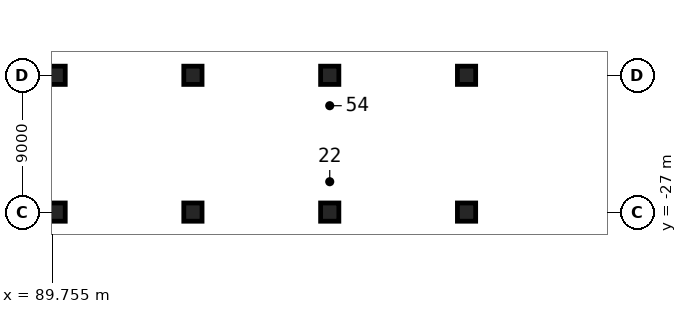
"""IFC4 building model, lengths in metres.
Left out: names, types, materials, properties, quantities, classifications, styles, units other than length and angle.
Written with IfcOpenShell. Run it as: python <this file> out.ifc"""

import sys

from ifc_helpers import new_model, si_unit, direction, frame, origin, origin_2d, place, context, subcontext, project, spatial, rectangle, extrude, element, save


model = new_model("IFC4")
c1 = context("Model", 3, precision=1e-05, world=origin(), true_north=direction((0.0, 1.0)))
c2 = subcontext(c1, "Body", "Model", "MODEL_VIEW")
j1 = project(units=[si_unit("LENGTHUNIT", "METRE"), si_unit("PLANEANGLEUNIT", "RADIAN")], contexts=[c1])
p1 = place(None, origin())
s1 = spatial("IfcSite", under=j1, at=p1, CompositionType="ELEMENT")
p2 = place(p1, origin())
s2 = spatial("IfcBuilding", under=s1, at=p2, CompositionType="ELEMENT")
p3 = place(p2, frame((0.0, 0.0, -9.0)))
s3 = spatial("IfcBuildingStorey", under=s2, at=p3, CompositionType="ELEMENT", Elevation=-9.0)
for number, where, z_axis, x_axis in (
    (1, (90.0, -27.0, 0.0), (0.0, 0.0, 1.0), (1.0, 0.0, 0.0)),
    (2, (90.0, -18.0, 0.0), (0.0, 0.0, 1.0), (1.0, 0.0, 0.0)),
    (3, (99.0, -27.0, 0.0), (0.0, 0.0, 1.0), (1.0, 0.0, 0.0)),
    (4, (99.0, -18.0, 0.0), (0.0, 0.0, 1.0), (1.0, 0.0, 0.0)),
    (5, (108.0, -27.0, 0.0), (0.0, 0.0, 1.0), (1.0, 0.0, 0.0)),
    (6, (108.0, -18.0, 0.0), (0.0, 0.0, 1.0), (1.0, 0.0, 0.0)),
    (7, (117.0, -27.0, 0.0), (0.0, 0.0, 1.0), (1.0, 0.0, 0.0)),
    (8, (117.0, -18.0, 0.0), (0.0, 0.0, 1.0), (1.0, 0.0, 0.0)),
):
    element("IfcColumn", number, at=place(p3, frame(where, z_axis=z_axis, x_axis=x_axis)), inside=s3, PredefinedType="COLUMN", context=c2, shape_type="SweptSolid", body=[
        extrude(rectangle(XDim=1.2, YDim=1.2, at=origin_2d()), origin(), (0.0, 0.0, 1.0), 4.5),
    ])
save(model, sys.argv[1])
